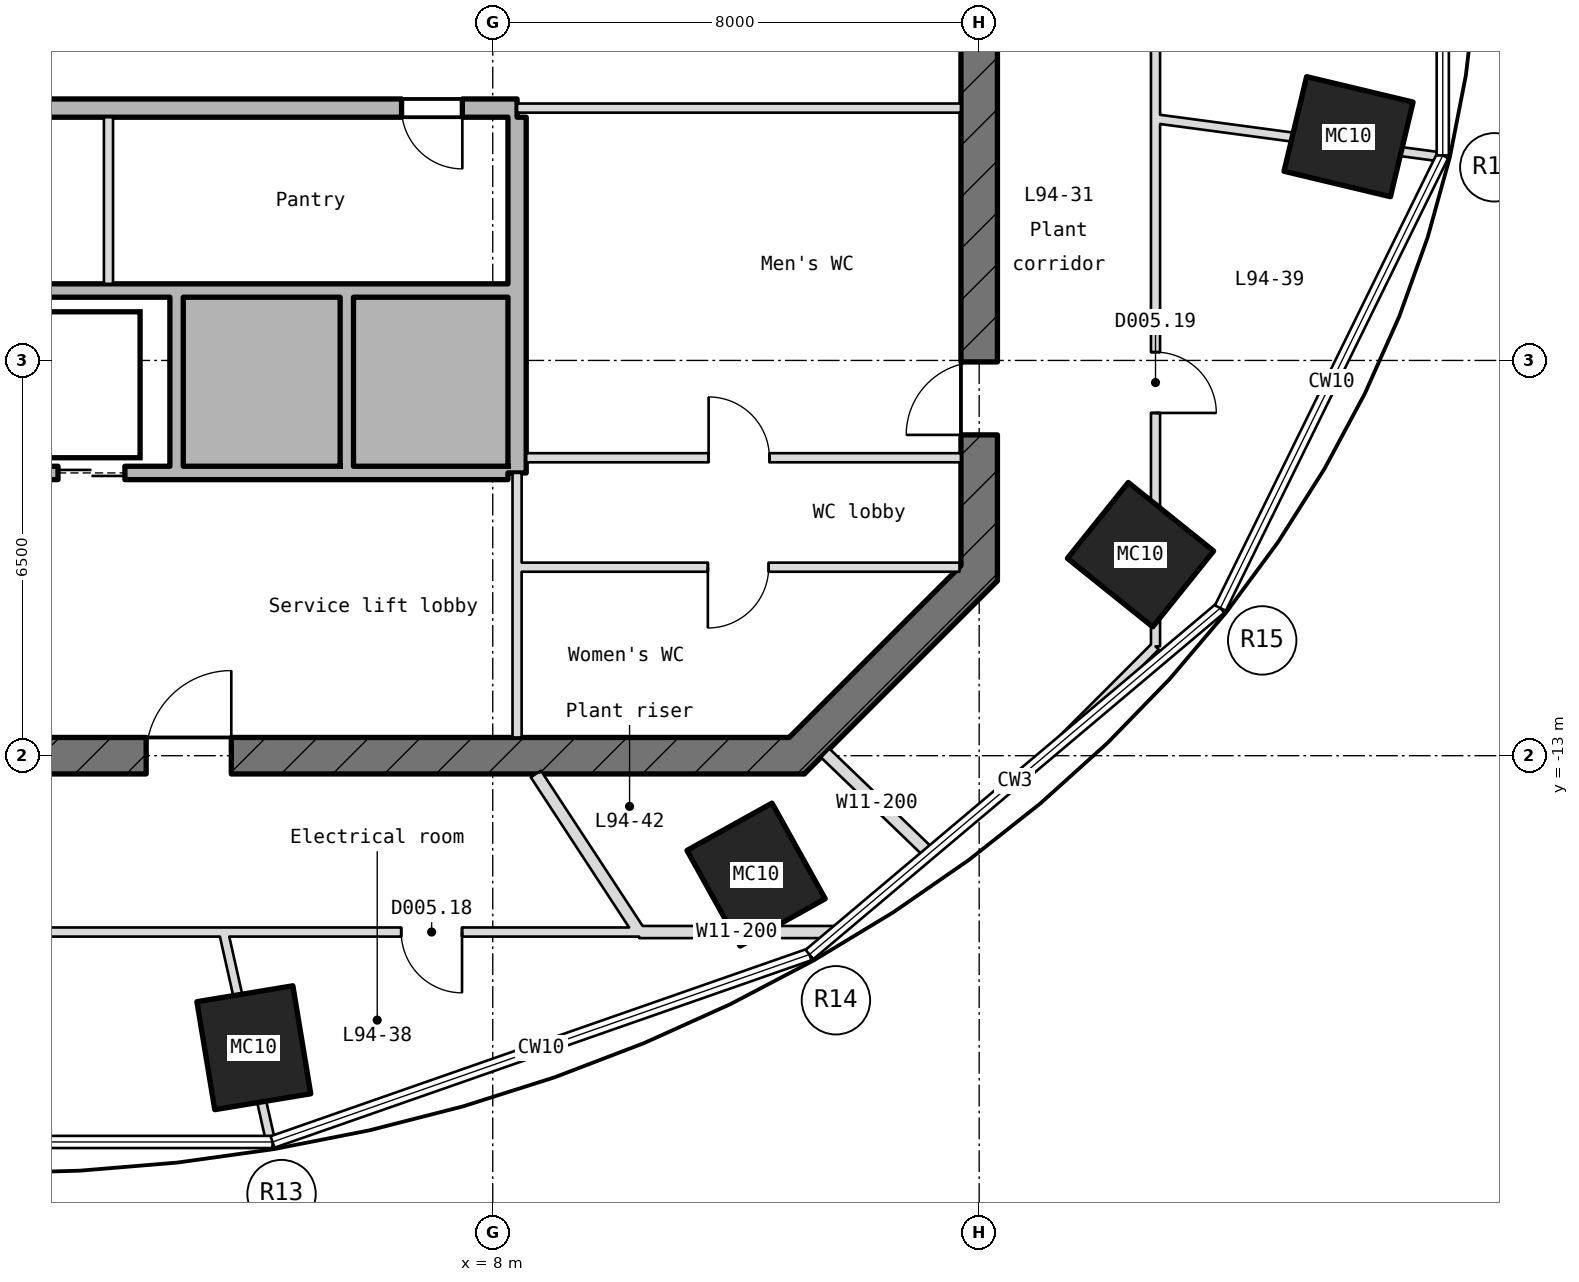
"""IFC4 building model, lengths in metres.
Left out: names, types, materials, properties, quantities, classifications, styles, units other than length and angle.
Written with IfcOpenShell. Run it as: python <this file> out.ifc"""

import sys

from ifc_helpers import new_model, si_unit, direction, frame, frame_2d, origin, origin_2d, place, context, subcontext, project, spatial, rectangle, hollow_rectangle, extrude, element, fill, save


model = new_model("IFC4")
c1 = context("Model", 3, precision=1e-05, world=origin(), true_north=direction((0.0, 1.0)))
c2 = subcontext(c1, "Body", "Model", "MODEL_VIEW")
j1 = project(units=[si_unit("LENGTHUNIT", "METRE"), si_unit("PLANEANGLEUNIT", "RADIAN")], contexts=[c1])
p1 = place(None, origin())
s1 = spatial("IfcSite", under=j1, at=p1, CompositionType="ELEMENT")
p2 = place(p1, origin())
s2 = spatial("IfcBuilding", under=s1, at=p2, CompositionType="ELEMENT")
p3 = place(p2, frame((0.0, 0.0, 418.55)))
s3 = spatial("IfcBuildingStorey", under=s2, at=p3, CompositionType="ELEMENT", Elevation=418.55)
for number, where, z_axis, x_axis in (
    (1, (4.071, -17.802, -0.2), (0.0, 0.0, 1.0), (-0.987, -0.163, 0.0)),
    (2, (12.331, -14.955, -0.2), (0.0, 0.0, 1.0), (-0.874, -0.486, 0.0)),
    (3, (18.653, -9.694, -0.2), (0.0, 0.0, 1.0), (-0.626, -0.78, 0.0)),
    (4, (22.075, -2.82, -0.2), (0.0, 0.0, 1.0), (-0.232, -0.973, 0.0)),
):
    element("IfcColumn", number, at=place(p3, frame(where, z_axis=z_axis, x_axis=x_axis)), inside=s3, PredefinedType="COLUMN", context=c2, shape_type="SweptSolid", body=[
        extrude(hollow_rectangle(XDim=1.6, YDim=1.8, WallThickness=0.045, at=origin_2d()), origin(), (0.0, 0.0, 1.0), 4.9),
    ])
p4 = place(p3, frame((12.912, -13.088, -0.2), z_axis=(0.0, 0.0, 1.0), x_axis=(0.707106781187, 0.707106781187, 0.0)))
e5 = element("IfcWall", 5, at=p4, inside=s3, PredefinedType="SHEAR", context=c2, shape_type="SweptSolid", body=[
    extrude(rectangle(XDim=4.491, YDim=0.6, at=frame_2d((2.246, 0.0))), origin(), (0.0, 0.0, 1.0), 4.9),
])
p5 = place(p3, frame((16.0, -10.124, -0.2), z_axis=(0.0, 0.0, 1.0), x_axis=(0.0, 1.0, 0.0)))
e6 = element("IfcWall", 6, at=p5, inside=s3, PredefinedType="SHEAR", context=c2, shape_type="SweptSolid", body=[
    extrude(rectangle(XDim=20.249, YDim=0.6, at=frame_2d((10.124, 0.0))), origin(), (0.0, 0.0, 1.0), 4.9),
])
p6 = place(p5, frame((8.924, 0.0, 0.2)))
e7 = element("IfcOpeningElement", 7, at=p6, cuts=e6, PredefinedType="OPENING", context=c2, shape_type="SweptSolid", body=[
    extrude(rectangle(XDim=2.4, YDim=2.1, at=frame_2d((1.2, 1.05))), frame((0.0, 0.31, 0.0), z_axis=(0.0, -1.0, 0.0), x_axis=(1.0, 0.0, 0.0)), (0.0, 0.0, 1.0), 0.62),
])
p7 = place(p5, frame((13.524, 0.0, 0.2)))
e8 = element("IfcOpeningElement", 8, at=p7, cuts=e6, PredefinedType="OPENING", context=c2, shape_type="SweptSolid", body=[
    extrude(rectangle(XDim=1.2, YDim=2.1, at=frame_2d((0.6, 1.05))), frame((0.0, 0.31, 0.0), z_axis=(0.0, -1.0, 0.0), x_axis=(1.0, 0.0, 0.0)), (0.0, 0.0, 1.0), 0.62),
])
p8 = place(p5, frame((2.4, 0.0, 0.2)))
e9 = element("IfcOpeningElement", 9, at=p8, cuts=e6, PredefinedType="OPENING", context=c2, shape_type="SweptSolid", body=[
    extrude(rectangle(XDim=1.2, YDim=2.1, at=frame_2d((0.6, 1.05))), frame((0.0, 0.31, 0.0), z_axis=(0.0, -1.0, 0.0), x_axis=(1.0, 0.0, 0.0)), (0.0, 0.0, 1.0), 0.62),
])
p9 = place(p3, frame((-13.124, -13.0, -0.2), z_axis=(0.0, 0.0, 1.0), x_axis=(1.0, 0.0, 0.0)))
e10 = element("IfcWall", 10, at=p9, inside=s3, PredefinedType="SHEAR", context=c2, shape_type="SweptSolid", body=[
    extrude(rectangle(XDim=26.249, YDim=0.6, at=frame_2d((13.124, 0.0))), origin(), (0.0, 0.0, 1.0), 4.9),
])
p10 = place(p9, frame((2.824, 0.0, 0.2)))
e11 = element("IfcOpeningElement", 11, at=p10, cuts=e10, PredefinedType="OPENING", context=c2, shape_type="SweptSolid", body=[
    extrude(rectangle(XDim=1.2, YDim=2.1, at=frame_2d((0.6, 1.05))), frame((0.0, 0.31, 0.0), z_axis=(0.0, -1.0, 0.0), x_axis=(1.0, 0.0, 0.0)), (0.0, 0.0, 1.0), 0.62),
])
p11 = place(p9, frame((6.824, 0.0, 0.2)))
e12 = element("IfcOpeningElement", 12, at=p11, cuts=e10, PredefinedType="OPENING", context=c2, shape_type="SweptSolid", body=[
    extrude(rectangle(XDim=1.4, YDim=2.1, at=frame_2d((0.7, 1.05))), frame((0.0, 0.31, 0.0), z_axis=(0.0, -1.0, 0.0), x_axis=(1.0, 0.0, 0.0)), (0.0, 0.0, 1.0), 0.62),
])
p12 = place(p9, frame((15.424, 0.0, 0.2)))
e13 = element("IfcOpeningElement", 13, at=p12, cuts=e10, PredefinedType="OPENING", context=c2, shape_type="SweptSolid", body=[
    extrude(rectangle(XDim=1.4, YDim=2.1, at=frame_2d((0.7, 1.05))), frame((0.0, 0.31, 0.0), z_axis=(0.0, -1.0, 0.0), x_axis=(1.0, 0.0, 0.0)), (0.0, 0.0, 1.0), 0.62),
])
p13 = place(p3, frame((8.475, -9.9, 0.0), z_axis=(0.0, 0.0, 1.0), x_axis=(1.0, 0.0, 0.0)))
e14 = element("IfcWall", 14, at=p13, inside=s3, PredefinedType="PARTITIONING", context=c2, shape_type="SweptSolid", body=[
    extrude(rectangle(XDim=7.201, YDim=0.15, at=frame_2d((3.6, 0.0))), origin(), (0.0, 0.0, 1.0), 4.7),
])
p14 = place(p13, frame((3.063, 0.0, 0.0)))
e15 = element("IfcOpeningElement", 15, at=p14, cuts=e14, PredefinedType="OPENING", context=c2, shape_type="SweptSolid", body=[
    extrude(rectangle(XDim=1.0, YDim=2.1, at=frame_2d((0.5, 1.05))), frame((0.0, 0.085, 0.0), z_axis=(0.0, -1.0, 0.0), x_axis=(1.0, 0.0, 0.0)), (0.0, 0.0, 1.0), 0.17),
])
p15 = place(p3, frame((-2.69, -8.35, 0.0), z_axis=(0.0, 0.0, 1.0), x_axis=(1.0, 0.0, 0.0)))
e16 = element("IfcWall", 16, at=p15, inside=s3, PredefinedType="STANDARD", context=c2, shape_type="SweptSolid", body=[
    extrude(rectangle(XDim=10.94, YDim=0.22, at=frame_2d((5.47, 0.0))), origin(), (0.0, 0.0, 1.0), 4.7),
])
p16 = place(p15, frame((0.74, 0.0, 0.0)))
e17 = element("IfcOpeningElement", 17, at=p16, cuts=e16, PredefinedType="OPENING", context=c2, shape_type="SweptSolid", body=[
    extrude(rectangle(XDim=1.1, YDim=2.1, at=frame_2d((0.55, 1.05))), frame((0.0, 0.12, 0.0), z_axis=(0.0, -1.0, 0.0), x_axis=(1.0, 0.0, 0.0)), (0.0, 0.0, 1.0), 0.24),
])
p17 = place(p15, frame((3.54, 0.0, 0.0)))
e18 = element("IfcOpeningElement", 18, at=p17, cuts=e16, PredefinedType="OPENING", context=c2, shape_type="SweptSolid", body=[
    extrude(rectangle(XDim=1.1, YDim=2.1, at=frame_2d((0.55, 1.05))), frame((0.0, 0.12, 0.0), z_axis=(0.0, -1.0, 0.0), x_axis=(1.0, 0.0, 0.0)), (0.0, 0.0, 1.0), 0.24),
])
p18 = place(p3, frame((8.55, -8.1, 0.0), z_axis=(0.0, 0.0, 1.0), x_axis=(1.0, 0.0, 0.0)))
e19 = element("IfcWall", 19, at=p18, inside=s3, PredefinedType="PARTITIONING", context=c2, shape_type="SweptSolid", body=[
    extrude(rectangle(XDim=7.15, YDim=0.15, at=frame_2d((3.575, 0.0))), origin(), (0.0, 0.0, 1.0), 4.7),
])
p19 = place(p18, frame((3.0, 0.0, 0.0)))
e20 = element("IfcOpeningElement", 20, at=p19, cuts=e19, PredefinedType="OPENING", context=c2, shape_type="SweptSolid", body=[
    extrude(rectangle(XDim=1.0, YDim=2.1, at=frame_2d((0.5, 1.05))), frame((0.0, 0.085, 0.0), z_axis=(0.0, -1.0, 0.0), x_axis=(1.0, 0.0, 0.0)), (0.0, 0.0, 1.0), 0.17),
])
p20 = place(p3, frame((-8.25, -5.35, 0.0), z_axis=(0.0, 0.0, 1.0), x_axis=(1.0, 0.0, 0.0)))
e21 = element("IfcWall", 21, at=p20, inside=s3, PredefinedType="STANDARD", context=c2, shape_type="SweptSolid", body=[
    extrude(rectangle(XDim=16.5, YDim=0.22, at=frame_2d((8.25, 0.0))), origin(), (0.0, 0.0, 1.0), 4.7),
])
p21 = place(p3, frame((-8.4, -2.35, -0.2), z_axis=(0.0, 0.0, 1.0), x_axis=(1.0, 0.0, 0.0)))
e22 = element("IfcWall", 22, at=p21, inside=s3, PredefinedType="SHEAR", context=c2, shape_type="SweptSolid", body=[
    extrude(rectangle(XDim=16.8, YDim=0.3, at=frame_2d((8.4, 0.0))), origin(), (0.0, 0.0, 1.0), 4.9),
])
p22 = place(p21, frame((0.9, 0.0, 0.2)))
e23 = element("IfcOpeningElement", 23, at=p22, cuts=e22, PredefinedType="OPENING", context=c2, shape_type="SweptSolid", body=[
    extrude(rectangle(XDim=1.0, YDim=2.1, at=frame_2d((0.5, 1.05))), frame((0.0, 0.16, 0.0), z_axis=(0.0, -1.0, 0.0), x_axis=(1.0, 0.0, 0.0)), (0.0, 0.0, 1.0), 0.32),
])
p23 = place(p21, frame((6.5, 0.0, 0.2)))
e24 = element("IfcOpeningElement", 24, at=p23, cuts=e22, PredefinedType="OPENING", context=c2, shape_type="SweptSolid", body=[
    extrude(rectangle(XDim=1.0, YDim=2.1, at=frame_2d((0.5, 1.05))), frame((0.0, 0.16, 0.0), z_axis=(0.0, -1.0, 0.0), x_axis=(1.0, 0.0, 0.0)), (0.0, 0.0, 1.0), 0.32),
])
p24 = place(p21, frame((14.9, 0.0, 0.2)))
e25 = element("IfcOpeningElement", 25, at=p24, cuts=e22, PredefinedType="OPENING", context=c2, shape_type="SweptSolid", body=[
    extrude(rectangle(XDim=1.0, YDim=2.1, at=frame_2d((0.5, 1.05))), frame((0.0, 0.16, 0.0), z_axis=(0.0, -1.0, 0.0), x_axis=(1.0, 0.0, 0.0)), (0.0, 0.0, 1.0), 0.32),
])
p25 = place(p3, frame((8.4, -2.35, 0.0), z_axis=(0.0, 0.0, 1.0), x_axis=(1.0, 0.0, 0.0)))
e26 = element("IfcWall", 26, at=p25, inside=s3, PredefinedType="PARTITIONING", context=c2, shape_type="SweptSolid", body=[
    extrude(rectangle(XDim=7.3, YDim=0.15, at=frame_2d((3.65, 0.0))), origin(), (0.0, 0.0, 1.0), 4.7),
])
p26 = place(p3, frame((1.68, -5.24, 0.0), z_axis=(0.0, 0.0, 1.0), x_axis=(0.0, 1.0, 0.0)))
e27 = element("IfcWall", 27, at=p26, inside=s3, PredefinedType="PARTITIONING", context=c2, shape_type="SweptSolid", body=[
    extrude(rectangle(XDim=2.74, YDim=0.15, at=frame_2d((1.37, 0.0))), origin(), (0.0, 0.0, 1.0), 4.7),
])
for number, where, z_axis, x_axis in (
    (28, (2.8, -8.24, 0.0), (0.0, 0.0, 1.0), (0.0, 1.0, 0.0)),
    (29, (5.6, -8.24, 0.0), (0.0, 0.0, 1.0), (0.0, 1.0, 0.0)),
):
    element("IfcWall", number, at=place(p3, frame(where, z_axis=z_axis, x_axis=x_axis)), inside=s3, PredefinedType="STANDARD", context=c2, shape_type="SweptSolid", body=[
        extrude(rectangle(XDim=2.78, YDim=0.22, at=frame_2d((1.39, 0.0))), origin(), (0.0, 0.0, 1.0), 4.7),
    ])
p27 = place(p3, frame((8.4, -12.7, 0.0), z_axis=(0.0, 0.0, 1.0), x_axis=(0.0, 1.0, 0.0)))
e30 = element("IfcWall", 30, at=p27, inside=s3, PredefinedType="PARTITIONING", context=c2, shape_type="SweptSolid", body=[
    extrude(rectangle(XDim=4.35, YDim=0.15, at=frame_2d((2.175, 0.0))), origin(), (0.0, 0.0, 1.0), 4.7),
])
p28 = place(p3, frame((8.4, -8.35, -0.2), z_axis=(0.0, 0.0, 1.0), x_axis=(0.0, 1.0, 0.0)))
e31 = element("IfcWall", 31, at=p28, inside=s3, PredefinedType="SHEAR", context=c2, shape_type="SweptSolid", body=[
    extrude(rectangle(XDim=5.85, YDim=0.3, at=frame_2d((2.925, 0.0))), origin(), (0.0, 0.0, 1.0), 4.9),
])
p29 = place(p3, frame((-11.202, -15.9, 0.0), z_axis=(0.0, 0.0, 1.0), x_axis=(1.0, 0.0, 0.0)))
e32 = element("IfcWall", 32, at=p29, inside=s3, PredefinedType="PARTITIONING", context=c2, shape_type="SweptSolid", body=[
    extrude(rectangle(XDim=21.614, YDim=0.15, at=frame_2d((10.807, 0.0))), origin(), (0.0, 0.0, 1.0), 4.7),
])
p30 = place(p29, frame((8.207, 0.0, 0.0)))
e33 = element("IfcOpeningElement", 33, at=p30, cuts=e32, PredefinedType="OPENING", context=c2, shape_type="SweptSolid", body=[
    extrude(rectangle(XDim=1.0, YDim=2.1, at=frame_2d((0.5, 1.05))), frame((0.0, 0.085, 0.0), z_axis=(0.0, -1.0, 0.0), x_axis=(1.0, 0.0, 0.0)), (0.0, 0.0, 1.0), 0.17),
])
p31 = place(p29, frame((17.697, 0.0, 0.0)))
e34 = element("IfcOpeningElement", 34, at=p31, cuts=e32, PredefinedType="OPENING", context=c2, shape_type="SweptSolid", body=[
    extrude(rectangle(XDim=1.0, YDim=2.1, at=frame_2d((0.5, 1.05))), frame((0.0, 0.085, 0.0), z_axis=(0.0, -1.0, 0.0), x_axis=(1.0, 0.0, 0.0)), (0.0, 0.0, 1.0), 0.17),
])
p32 = place(p3, frame((17.347, -12.755, 0.0), z_axis=(0.0, 0.0, 1.0), x_axis=(0.707106781187, 0.707106781187, 0.0)))
e35 = element("IfcWall", 35, at=p32, inside=s3, PredefinedType="PARTITIONING", context=c2, shape_type="SweptSolid", body=[
    extrude(rectangle(XDim=2.197, YDim=0.15, at=frame_2d((1.098, 0.0))), origin(), (0.0, 0.0, 1.0), 4.7),
])
p33 = place(p3, frame((18.9, -11.201, 0.0), z_axis=(0.0, 0.0, 1.0), x_axis=(0.0, 1.0, 0.0)))
e36 = element("IfcWall", 36, at=p33, inside=s3, PredefinedType="PARTITIONING", context=c2, shape_type="SweptSolid", body=[
    extrude(rectangle(XDim=22.403, YDim=0.15, at=frame_2d((11.201, 0.0))), origin(), (0.0, 0.0, 1.0), 4.7),
])
p34 = place(p33, frame((3.838, 0.0, 0.0)))
e37 = element("IfcOpeningElement", 37, at=p34, cuts=e36, PredefinedType="OPENING", context=c2, shape_type="SweptSolid", body=[
    extrude(rectangle(XDim=1.0, YDim=2.1, at=frame_2d((0.5, 1.05))), frame((0.0, 0.085, 0.0), z_axis=(0.0, -1.0, 0.0), x_axis=(1.0, 0.0, 0.0)), (0.0, 0.0, 1.0), 0.17),
])
p35 = place(p33, frame((13.189, 0.0, 0.0)))
e38 = element("IfcOpeningElement", 38, at=p35, cuts=e36, PredefinedType="OPENING", context=c2, shape_type="SweptSolid", body=[
    extrude(rectangle(XDim=1.0, YDim=2.1, at=frame_2d((0.5, 1.05))), frame((0.0, 0.085, 0.0), z_axis=(0.0, -1.0, 0.0), x_axis=(1.0, 0.0, 0.0)), (0.0, 0.0, 1.0), 0.17),
])
p36 = place(p33, frame((20.102, 0.0, 0.0)))
e39 = element("IfcOpeningElement", 39, at=p36, cuts=e36, PredefinedType="OPENING", context=c2, shape_type="SweptSolid", body=[
    extrude(rectangle(XDim=0.9, YDim=2.1, at=frame_2d((0.45, 1.05))), frame((0.0, 0.085, 0.0), z_axis=(0.0, -1.0, 0.0), x_axis=(1.0, 0.0, 0.0)), (0.0, 0.0, 1.0), 0.17),
])
p37 = place(p3, frame((4.344, -19.332, 0.0), z_axis=(0.0, 0.0, 1.0), x_axis=(-0.219298106663, 0.975657901323, 0.0)))
e40 = element("IfcWall", 40, at=p37, inside=s3, PredefinedType="PARTITIONING", context=c2, shape_type="SweptSolid", body=[
    extrude(rectangle(XDim=1.954, YDim=0.15, at=frame_2d((0.977, 0.0))), origin(), (0.0, 0.0, 1.0), 4.7),
])
p38 = place(p3, frame((3.916, -17.426, 0.0), z_axis=(0.0, 0.0, 1.0), x_axis=(-0.219144481839, 0.975692418787, 0.0)))
e41 = element("IfcWall", 41, at=p38, inside=s3, PredefinedType="PARTITIONING", context=c2, shape_type="SweptSolid", body=[
    extrude(rectangle(XDim=1.564, YDim=0.15, at=frame_2d((0.782, 0.0))), origin(), (0.0, 0.0, 1.0), 4.347),
])
p39 = place(p3, frame((23.59, -3.153, 0.0), z_axis=(0.0, 0.0, 1.0), x_axis=(-0.991190460291, 0.13244422006, 0.0)))
e42 = element("IfcWall", 42, at=p39, inside=s3, PredefinedType="PARTITIONING", context=c2, shape_type="SweptSolid", body=[
    extrude(rectangle(XDim=4.732, YDim=0.15, at=frame_2d((2.366, 0.0))), origin(), (0.0, 0.0, 1.0), 4.7),
])
p40 = place(p3, frame((10.408, -15.9, 0.0), z_axis=(0.0, 0.0, 1.0), x_axis=(1.0, 0.0, 0.0)))
e43 = element("IfcWall", 43, at=p40, inside=s3, PredefinedType="PARTITIONING", context=c2, shape_type="SweptSolid", body=[
    extrude(rectangle(XDim=3.208, YDim=0.2, at=frame_2d((1.604, 0.0))), origin(), (0.0, 0.0, 1.0), 4.7),
])
p41 = place(p3, frame((10.411, -15.9, 0.0), z_axis=(0.0, 0.0, 1.0), x_axis=(-0.547810161897, 0.836602669445, 0.0)))
e44 = element("IfcWall", 44, at=p41, inside=s3, PredefinedType="PARTITIONING", context=c2, shape_type="SweptSolid", body=[
    extrude(rectangle(XDim=3.108, YDim=0.2, at=frame_2d((1.554, 0.0))), origin(), (0.0, 0.0, 1.0), 4.7),
])
p42 = place(p3, frame((15.167, -14.592, 0.0), z_axis=(0.0, 0.0, 1.0), x_axis=(-0.720588348466, 0.69336313145, 0.0)))
e45 = element("IfcWall", 45, at=p42, inside=s3, PredefinedType="PARTITIONING", context=c2, shape_type="SweptSolid", body=[
    extrude(rectangle(XDim=2.358, YDim=0.2, at=frame_2d((1.179, 0.0))), origin(), (0.0, 0.0, 1.0), 4.7),
])
p43 = place(p17, origin())
e46 = element("IfcDoor", 46, at=p43, inside=s3, OperationType="DOUBLE_DOOR_SLIDING", PredefinedType="DOOR", context=c2, shape_type="SweptSolid", body=[
    extrude(rectangle(XDim=1.1, YDim=2.1, at=frame_2d((0.55, 1.05))), frame((0.0, 0.025, 0.0), z_axis=(0.0, -1.0, 0.0), x_axis=(1.0, 0.0, 0.0)), (0.0, 0.0, 1.0), 0.05),
])
fill(e18, e46)
p44 = place(p12, origin())
e47 = element("IfcDoor", 47, at=p44, inside=s3, OperationType="SINGLE_SWING_RIGHT", PredefinedType="DOOR", context=c2, shape_type="SweptSolid", body=[
    extrude(rectangle(XDim=1.4, YDim=2.1, at=frame_2d((0.7, 1.05))), frame((0.0, 0.025, 0.0), z_axis=(0.0, -1.0, 0.0), x_axis=(1.0, 0.0, 0.0)), (0.0, 0.0, 1.0), 0.05),
])
fill(e13, e47)
p45 = place(p24, frame((1.0, 0.0, 0.0), z_axis=(0.0, 0.0, 1.0), x_axis=(-1.0, 0.0, 0.0)))
e48 = element("IfcDoor", 48, at=p45, inside=s3, OperationType="SINGLE_SWING_LEFT", PredefinedType="DOOR", context=c2, shape_type="SweptSolid", body=[
    extrude(rectangle(XDim=1.0, YDim=2.1, at=frame_2d((0.5, 1.05))), frame((0.0, 0.025, 0.0), z_axis=(0.0, -1.0, 0.0), x_axis=(1.0, 0.0, 0.0)), (0.0, 0.0, 1.0), 0.05),
])
fill(e25, e48)
p46 = place(p19, origin())
e49 = element("IfcDoor", 49, at=p46, inside=s3, OperationType="SINGLE_SWING_RIGHT", PredefinedType="DOOR", context=c2, shape_type="SweptSolid", body=[
    extrude(rectangle(XDim=1.0, YDim=2.1, at=frame_2d((0.5, 1.05))), frame((0.0, 0.025, 0.0), z_axis=(0.0, -1.0, 0.0), x_axis=(1.0, 0.0, 0.0)), (0.0, 0.0, 1.0), 0.05),
])
fill(e20, e49)
p47 = place(p8, origin())
e50 = element("IfcDoor", 50, at=p47, inside=s3, OperationType="SINGLE_SWING_RIGHT", PredefinedType="DOOR", context=c2, shape_type="SweptSolid", body=[
    extrude(rectangle(XDim=1.2, YDim=2.1, at=frame_2d((0.6, 1.05))), frame((0.0, 0.025, 0.0), z_axis=(0.0, -1.0, 0.0), x_axis=(1.0, 0.0, 0.0)), (0.0, 0.0, 1.0), 0.05),
])
fill(e9, e50)
p48 = place(p14, frame((1.0, 0.0, 0.0), z_axis=(0.0, 0.0, 1.0), x_axis=(-1.0, 0.0, 0.0)))
e51 = element("IfcDoor", 51, at=p48, inside=s3, OperationType="SINGLE_SWING_LEFT", PredefinedType="DOOR", context=c2, shape_type="SweptSolid", body=[
    extrude(rectangle(XDim=1.0, YDim=2.1, at=frame_2d((0.5, 1.05))), frame((0.0, 0.025, 0.0), z_axis=(0.0, -1.0, 0.0), x_axis=(1.0, 0.0, 0.0)), (0.0, 0.0, 1.0), 0.05),
])
fill(e15, e51)
p49 = place(p31, frame((1.0, 0.0, 0.0), z_axis=(0.0, 0.0, 1.0), x_axis=(-1.0, 0.0, 0.0)))
e52 = element("IfcDoor", 52, at=p49, inside=s3, OperationType="SINGLE_SWING_LEFT", PredefinedType="DOOR", context=c2, shape_type="SweptSolid", body=[
    extrude(rectangle(XDim=1.0, YDim=2.1, at=frame_2d((0.5, 1.05))), frame((0.0, 0.025, 0.0), z_axis=(0.0, -1.0, 0.0), x_axis=(1.0, 0.0, 0.0)), (0.0, 0.0, 1.0), 0.05),
])
fill(e34, e52)
p50 = place(p34, frame((1.0, 0.0, 0.0), z_axis=(0.0, 0.0, 1.0), x_axis=(-1.0, 0.0, 0.0)))
e53 = element("IfcDoor", 53, at=p50, inside=s3, OperationType="SINGLE_SWING_LEFT", PredefinedType="DOOR", context=c2, shape_type="SweptSolid", body=[
    extrude(rectangle(XDim=1.0, YDim=2.1, at=frame_2d((0.5, 1.05))), frame((0.0, 0.025, 0.0), z_axis=(0.0, -1.0, 0.0), x_axis=(1.0, 0.0, 0.0)), (0.0, 0.0, 1.0), 0.05),
])
fill(e37, e53)
save(model, sys.argv[1])
